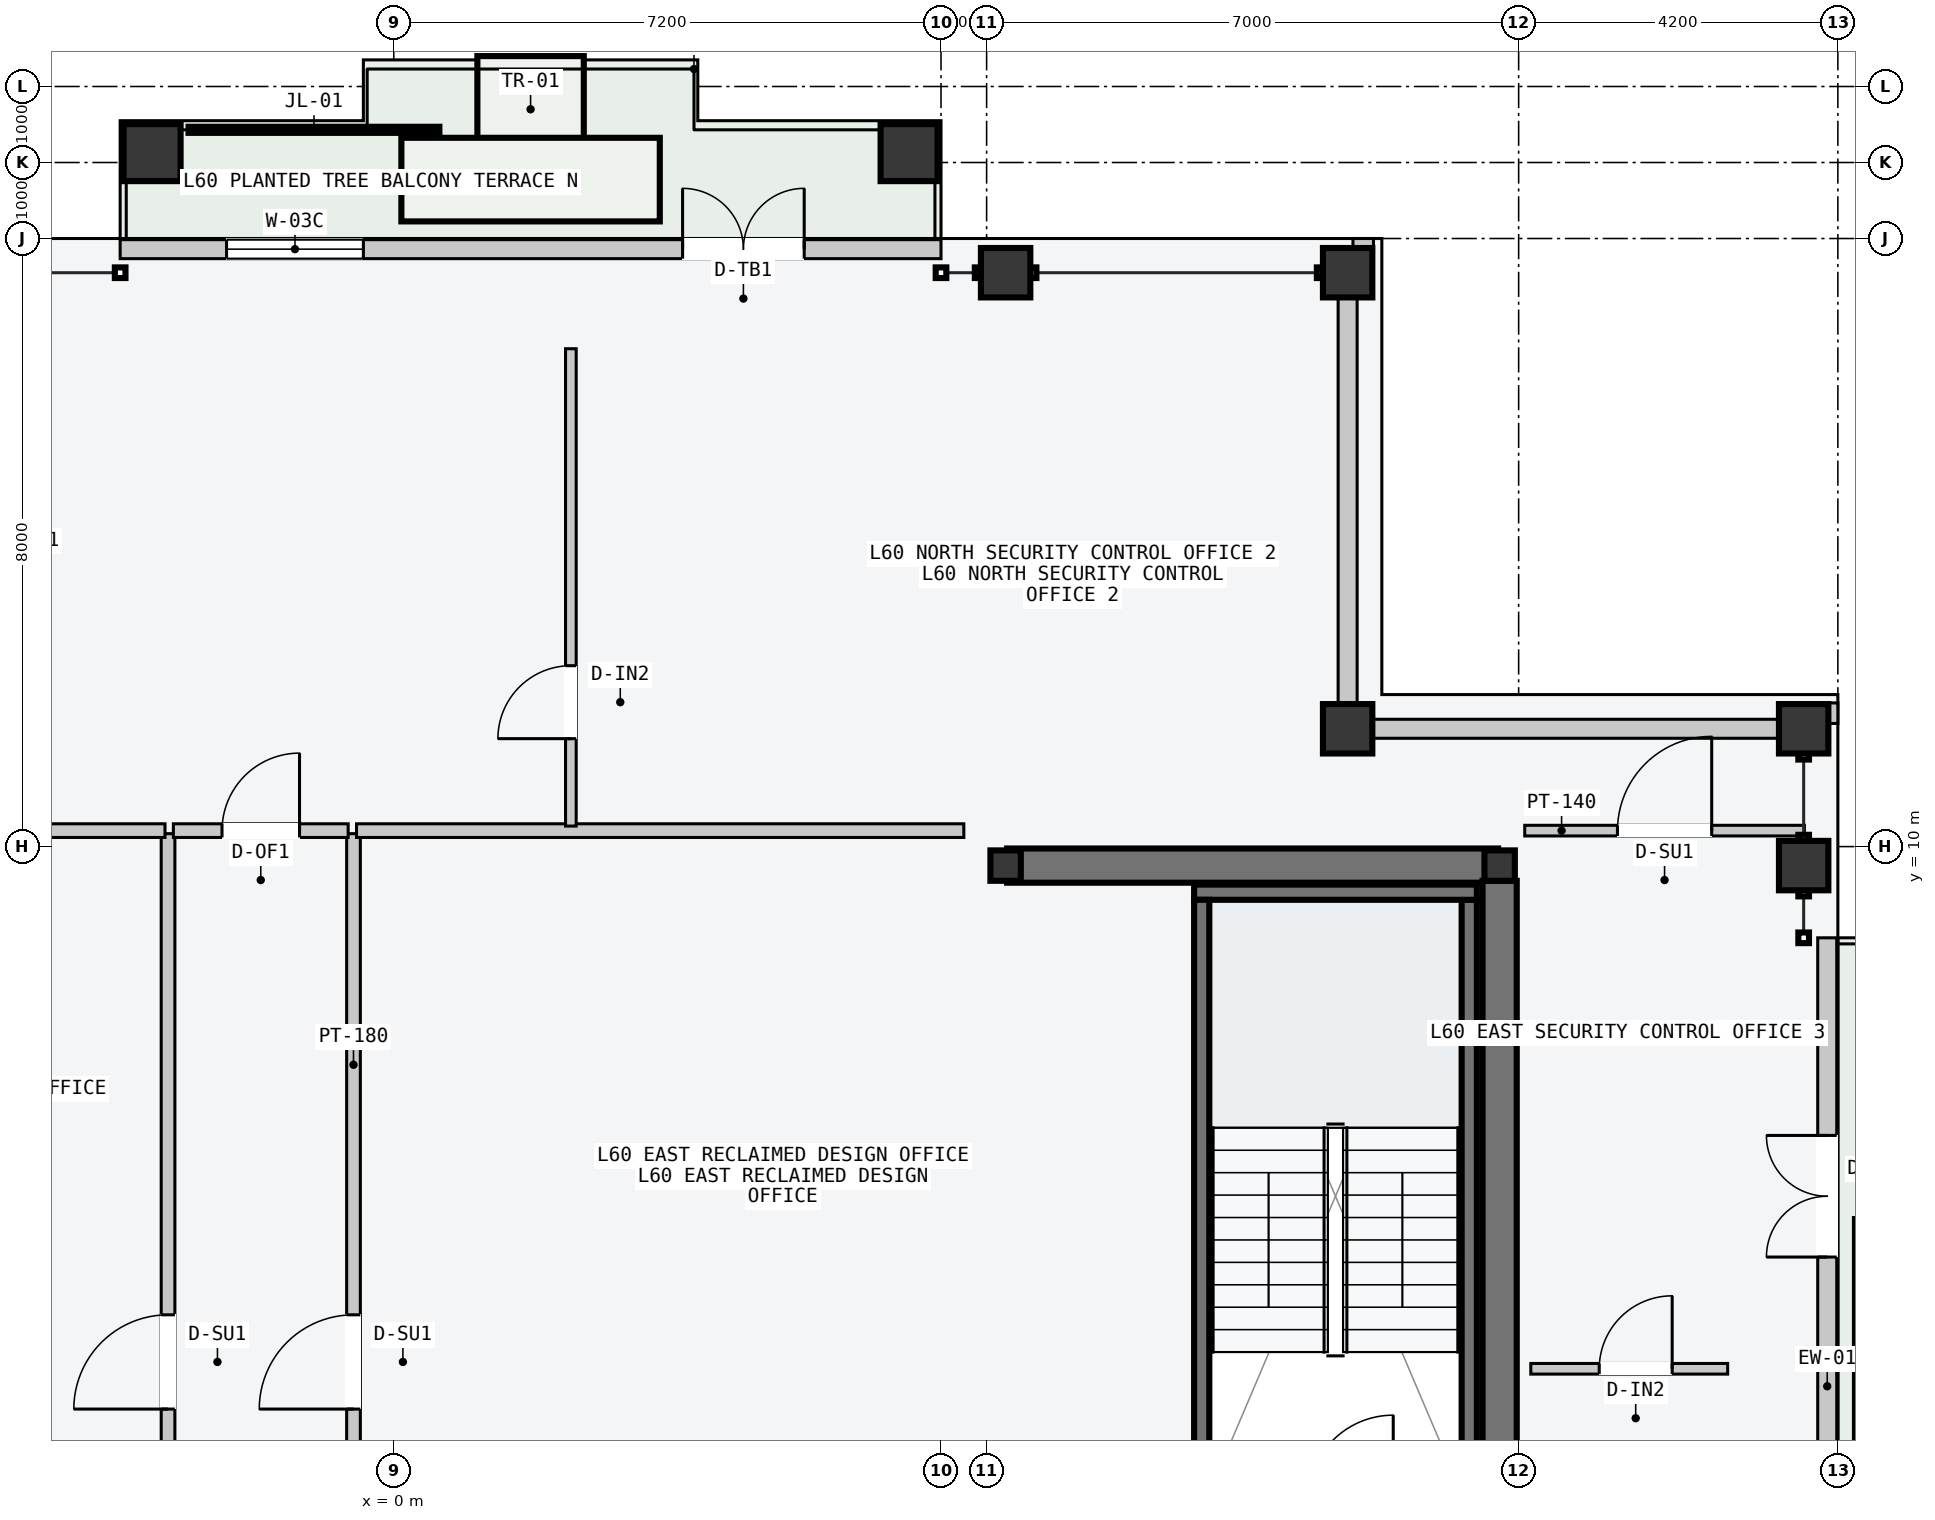
"""IFC4 building model, lengths in metres.
Left out: names, types, materials, properties, quantities, classifications, styles, units other than length and angle.
Written with IfcOpenShell. Run it as: python <this file> out.ifc"""

import sys

from ifc_helpers import new_model, si_unit, direction, frame, frame_2d, origin, origin_2d, place, context, subcontext, project, spatial, rectangle, hollow_rectangle, i_section, extrude, element, fill, save


model = new_model("IFC4")
c1 = context("Model", 3, precision=1e-05, world=origin(), true_north=direction((0.0, 1.0)))
c2 = subcontext(c1, "Body", "Model", "MODEL_VIEW")
j1 = project(units=[si_unit("LENGTHUNIT", "METRE"), si_unit("PLANEANGLEUNIT", "RADIAN")], contexts=[c1])
p1 = place(None, origin())
s1 = spatial("IfcSite", under=j1, at=p1, CompositionType="ELEMENT")
p2 = place(p1, origin())
s2 = spatial("IfcBuilding", under=s1, at=p2, CompositionType="ELEMENT")
p3 = place(p2, frame((0.0, 0.0, 229.2)))
s3 = spatial("IfcBuildingStorey", under=s2, at=p3, CompositionType="ELEMENT", Elevation=229.2)
p4 = place(p3, frame((8.07, 9.75, -0.2), z_axis=(0.0, 0.0, 1.0), x_axis=(1.0, 0.0, 0.0)))
e1 = element("IfcWall", 1, at=p4, inside=s3, PredefinedType="SHEAR", context=c2, shape_type="SweptSolid", body=[
    extrude(rectangle(XDim=6.46, YDim=0.45, at=frame_2d((3.23, 0.0))), origin(), (0.0, 0.0, 1.0), 3.6),
])
p5 = place(p3, frame((14.55, 0.2, -0.2), z_axis=(0.0, 0.0, 1.0), x_axis=(0.0, 1.0, 0.0)))
e2 = element("IfcWall", 2, at=p5, inside=s3, PredefinedType="SHEAR", context=c2, shape_type="SweptSolid", body=[
    extrude(rectangle(XDim=9.35, YDim=0.45, at=frame_2d((4.675, 0.0))), origin(), (0.0, 0.0, 1.0), 3.6),
])
p6 = place(p3, frame((14.15, 1.5, -0.2), z_axis=(0.0, 0.0, 1.0), x_axis=(0.0, 1.0, 0.0)))
e3 = element("IfcWall", 3, at=p6, inside=s3, PredefinedType="SOLIDWALL", context=c2, shape_type="SweptSolid", body=[
    extrude(rectangle(XDim=7.8, YDim=0.2, at=frame_2d((3.9, 0.0))), origin(), (0.0, 0.0, 1.0), 3.6),
])
p7 = place(p3, frame((10.53, 9.4, -0.2), z_axis=(0.0, 0.0, 1.0), x_axis=(1.0, 0.0, 0.0)))
e4 = element("IfcWall", 4, at=p7, inside=s3, PredefinedType="SOLIDWALL", context=c2, shape_type="SweptSolid", body=[
    extrude(rectangle(XDim=3.72, YDim=0.2, at=frame_2d((1.86, 0.0))), origin(), (0.0, 0.0, 1.0), 3.6),
])
p8 = place(p3, frame((10.63, 1.5, -0.2), z_axis=(0.0, 0.0, 1.0), x_axis=(0.0, 1.0, 0.0)))
e5 = element("IfcWall", 5, at=p8, inside=s3, PredefinedType="SOLIDWALL", context=c2, shape_type="SweptSolid", body=[
    extrude(rectangle(XDim=7.8, YDim=0.2, at=frame_2d((3.9, 0.0))), origin(), (0.0, 0.0, 1.0), 3.6),
])
for number, where, z_axis, x_axis in (
    (6, (8.05, 9.75, 0.0), (0.0, 0.0, 1.0), (1.0, 0.0, 0.0)),
    (7, (14.55, 9.75, 0.0), (0.0, 0.0, 1.0), (1.0, 0.0, 0.0)),
):
    element("IfcColumn", number, at=place(p3, frame(where, z_axis=z_axis, x_axis=x_axis)), inside=s3, PredefinedType="COLUMN", context=c2, shape_type="SweptSolid", body=[
        extrude(i_section(OverallWidth=0.4, OverallDepth=0.4, WebThickness=0.013, FlangeThickness=0.021, at=origin_2d()), origin(), (0.0, 0.0, 1.0), 3.6),
    ])
for number, where, z_axis, x_axis in (
    (8, (8.05, 17.55, 0.0), (0.0, 0.0, 1.0), (1.0, 0.0, 0.0)),
    (9, (12.55, 17.55, 0.0), (0.0, 0.0, 1.0), (1.0, 0.0, 0.0)),
    (10, (18.55, 9.75, 0.0), (0.0, 0.0, 1.0), (0.0, 1.0, 0.0)),
    (11, (18.55, 11.55, 0.0), (0.0, 0.0, 1.0), (0.0, 1.0, 0.0)),
    (12, (12.55, 11.55, 0.0), (0.0, 0.0, 1.0), (1.0, 0.0, 0.0)),
):
    element("IfcColumn", number, at=place(p3, frame(where, z_axis=z_axis, x_axis=x_axis)), inside=s3, PredefinedType="COLUMN", context=c2, shape_type="SweptSolid", body=[
        extrude(hollow_rectangle(XDim=0.65, YDim=0.65, WallThickness=0.028, at=origin_2d()), origin(), (0.0, 0.0, 1.0), 3.6),
    ])
for number, where, z_axis, x_axis in (
    (13, (-3.18, 19.13, 0.0), (0.0, 0.0, 1.0), (1.0, 0.0, 0.0)),
    (14, (6.78, 19.13, 0.0), (0.0, 0.0, 1.0), (1.0, 0.0, 0.0)),
):
    element("IfcColumn", number, at=place(p3, frame(where, z_axis=z_axis, x_axis=x_axis)), inside=s3, PredefinedType="COLUMN", context=c2, shape_type="SweptSolid", body=[
        extrude(hollow_rectangle(XDim=0.75, YDim=0.75, WallThickness=0.032, at=origin_2d()), origin(), (0.0, 0.0, 1.0), 3.6),
    ])
p9 = place(p3, frame((-3.6, 17.86, 0.0), z_axis=(0.0, 0.0, 1.0), x_axis=(1.0, 0.0, 0.0)))
e15 = element("IfcWall", 15, at=p9, inside=s3, PredefinedType="STANDARD", context=c2, shape_type="SweptSolid", body=[
    extrude(rectangle(XDim=10.8, YDim=0.25, at=frame_2d((5.4, 0.0))), origin(), (0.0, 0.0, 1.0), 3.4),
])
p10 = place(p9, frame((7.4, 0.0, 0.0)))
e16 = element("IfcOpeningElement", 16, at=p10, cuts=e15, PredefinedType="OPENING", context=c2, shape_type="SweptSolid", body=[
    extrude(rectangle(XDim=1.6, YDim=2.2, at=frame_2d((0.8, 1.1))), frame((0.0, 0.135, 0.0), z_axis=(0.0, -1.0, 0.0), x_axis=(1.0, 0.0, 0.0)), (0.0, 0.0, 1.0), 0.27),
])
p11 = place(p9, frame((1.4, 0.0, 0.85)))
e17 = element("IfcOpeningElement", 17, at=p11, cuts=e15, PredefinedType="OPENING", context=c2, shape_type="SweptSolid", body=[
    extrude(rectangle(XDim=1.8, YDim=2.05, at=frame_2d((0.9, 1.025))), frame((0.0, 0.135, 0.0), z_axis=(0.0, -1.0, 0.0), x_axis=(1.0, 0.0, 0.0)), (0.0, 0.0, 1.0), 0.27),
])
p12 = place(p3, frame((18.86, -2.0, 0.0), z_axis=(0.0, 0.0, 1.0), x_axis=(0.0, 1.0, 0.0)))
e18 = element("IfcWall", 18, at=p12, inside=s3, PredefinedType="STANDARD", context=c2, shape_type="SweptSolid", body=[
    extrude(rectangle(XDim=10.8, YDim=0.25, at=frame_2d((5.4, 0.0))), origin(), (0.0, 0.0, 1.0), 3.4),
])
p13 = place(p12, frame((6.6, 0.0, 0.0)))
e19 = element("IfcOpeningElement", 19, at=p13, cuts=e18, PredefinedType="OPENING", context=c2, shape_type="SweptSolid", body=[
    extrude(rectangle(XDim=1.6, YDim=2.2, at=frame_2d((0.8, 1.1))), frame((0.0, 0.135, 0.0), z_axis=(0.0, -1.0, 0.0), x_axis=(1.0, 0.0, 0.0)), (0.0, 0.0, 1.0), 0.27),
])
p14 = place(p12, frame((1.4, 0.0, 0.85)))
e20 = element("IfcOpeningElement", 20, at=p14, cuts=e18, PredefinedType="OPENING", context=c2, shape_type="SweptSolid", body=[
    extrude(rectangle(XDim=1.8, YDim=2.05, at=frame_2d((0.9, 1.025))), frame((0.0, 0.135, 0.0), z_axis=(0.0, -1.0, 0.0), x_axis=(1.0, 0.0, 0.0)), (0.0, 0.0, 1.0), 0.27),
])
for number, where, z_axis, x_axis in (
    (21, (12.885, 11.55, 0.0), (0.0, 0.0, 1.0), (1.0, 0.0, 0.0)),
    (22, (12.55, 11.885, 0.0), (0.0, 0.0, 1.0), (0.0, 1.0, 0.0)),
):
    element("IfcWall", number, at=place(p3, frame(where, z_axis=z_axis, x_axis=x_axis)), inside=s3, PredefinedType="STANDARD", context=c2, shape_type="SweptSolid", body=[
        extrude(rectangle(XDim=5.33, YDim=0.25, at=frame_2d((2.665, 0.0))), origin(), (0.0, 0.0, 1.0), 2.85),
    ])
for number, where, z_axis, x_axis in (
    (23, (12.62, 17.89, 0.0), (0.0, 0.0, 1.0), (1.0, 0.0, 0.0)),
    (24, (18.89, 11.62, 0.0), (0.0, 0.0, 1.0), (0.0, 1.0, 0.0)),
):
    element("IfcWall", number, at=place(p3, frame(where, z_axis=z_axis, x_axis=x_axis)), inside=s3, PredefinedType="PARAPET", context=c2, shape_type="SweptSolid", body=[
        extrude(rectangle(XDim=0.27, YDim=0.22, at=frame_2d((0.135, 0.0))), origin(), (0.0, 0.0, 1.0), 1.2),
    ])
p15 = place(p3, frame((-2.97, -3.5, 0.0), z_axis=(0.0, 0.0, 1.0), x_axis=(0.0, 1.0, 0.0)))
e25 = element("IfcWall", 25, at=p15, inside=s3, PredefinedType="PARTITIONING", context=c2, shape_type="SweptSolid", body=[
    extrude(rectangle(XDim=13.67, YDim=0.18, at=frame_2d((6.835, 0.0))), origin(), (0.0, 0.0, 1.0), 3.4),
])
p16 = place(p15, frame((6.1, 0.0, 0.0)))
e26 = element("IfcOpeningElement", 26, at=p16, cuts=e25, PredefinedType="OPENING", context=c2, shape_type="SweptSolid", body=[
    extrude(rectangle(XDim=1.24, YDim=2.24, at=frame_2d((0.62, 1.12))), frame((0.0, 0.1, 0.0), z_axis=(0.0, -1.0, 0.0), x_axis=(1.0, 0.0, 0.0)), (0.0, 0.0, 1.0), 0.2),
])
p17 = place(p15, frame((1.6, 0.0, 0.0)))
e27 = element("IfcOpeningElement", 27, at=p17, cuts=e25, PredefinedType="OPENING", context=c2, shape_type="SweptSolid", body=[
    extrude(rectangle(XDim=0.96, YDim=2.18, at=frame_2d((0.48, 1.09))), frame((0.0, 0.1, 0.0), z_axis=(0.0, -1.0, 0.0), x_axis=(1.0, 0.0, 0.0)), (0.0, 0.0, 1.0), 0.2),
])
p18 = place(p3, frame((-7.5, 10.21, 0.0), z_axis=(0.0, 0.0, 1.0), x_axis=(1.0, 0.0, 0.0)))
e28 = element("IfcWall", 28, at=p18, inside=s3, PredefinedType="PARTITIONING", context=c2, shape_type="SweptSolid", body=[
    extrude(rectangle(XDim=4.49, YDim=0.18, at=frame_2d((2.245, 0.0))), origin(), (0.0, 0.0, 1.0), 3.4),
])
p19 = place(p3, frame((-0.53, -3.5, 0.0), z_axis=(0.0, 0.0, 1.0), x_axis=(0.0, 1.0, 0.0)))
e29 = element("IfcWall", 29, at=p19, inside=s3, PredefinedType="PARTITIONING", context=c2, shape_type="SweptSolid", body=[
    extrude(rectangle(XDim=13.67, YDim=0.18, at=frame_2d((6.835, 0.0))), origin(), (0.0, 0.0, 1.0), 3.4),
])
p20 = place(p19, frame((6.1, 0.0, 0.0)))
e30 = element("IfcOpeningElement", 30, at=p20, cuts=e29, PredefinedType="OPENING", context=c2, shape_type="SweptSolid", body=[
    extrude(rectangle(XDim=1.24, YDim=2.24, at=frame_2d((0.62, 1.12))), frame((0.0, 0.1, 0.0), z_axis=(0.0, -1.0, 0.0), x_axis=(1.0, 0.0, 0.0)), (0.0, 0.0, 1.0), 0.2),
])
p21 = place(p19, frame((1.6, 0.0, 0.0)))
e31 = element("IfcOpeningElement", 31, at=p21, cuts=e29, PredefinedType="OPENING", context=c2, shape_type="SweptSolid", body=[
    extrude(rectangle(XDim=0.96, YDim=2.18, at=frame_2d((0.48, 1.09))), frame((0.0, 0.1, 0.0), z_axis=(0.0, -1.0, 0.0), x_axis=(1.0, 0.0, 0.0)), (0.0, 0.0, 1.0), 0.2),
])
p22 = place(p3, frame((-0.49, 10.21, 0.0), z_axis=(0.0, 0.0, 1.0), x_axis=(1.0, 0.0, 0.0)))
e32 = element("IfcWall", 32, at=p22, inside=s3, PredefinedType="PARTITIONING", context=c2, shape_type="SweptSolid", body=[
    extrude(rectangle(XDim=7.99, YDim=0.18, at=frame_2d((3.995, 0.0))), origin(), (0.0, 0.0, 1.0), 3.4),
])
p23 = place(p3, frame((2.33, 10.27, 0.0), z_axis=(0.0, 0.0, 1.0), x_axis=(0.0, 1.0, 0.0)))
e33 = element("IfcWall", 33, at=p23, inside=s3, PredefinedType="PARTITIONING", context=c2, shape_type="SweptSolid", body=[
    extrude(rectangle(XDim=6.28, YDim=0.14, at=frame_2d((3.14, 0.0))), origin(), (0.0, 0.0, 1.0), 3.4),
])
p24 = place(p23, frame((1.15, 0.0, 0.0)))
e34 = element("IfcOpeningElement", 34, at=p24, cuts=e33, PredefinedType="OPENING", context=c2, shape_type="SweptSolid", body=[
    extrude(rectangle(XDim=0.96, YDim=2.18, at=frame_2d((0.48, 1.09))), frame((0.0, 0.08, 0.0), z_axis=(0.0, -1.0, 0.0), x_axis=(1.0, 0.0, 0.0)), (0.0, 0.0, 1.0), 0.16),
])
p25 = place(p3, frame((-2.9, 10.21, 0.0), z_axis=(0.0, 0.0, 1.0), x_axis=(1.0, 0.0, 0.0)))
e35 = element("IfcWall", 35, at=p25, inside=s3, PredefinedType="PARTITIONING", context=c2, shape_type="SweptSolid", body=[
    extrude(rectangle(XDim=2.3, YDim=0.18, at=frame_2d((1.15, 0.0))), origin(), (0.0, 0.0, 1.0), 3.4),
])
p26 = place(p25, frame((0.64, 0.0, 0.0)))
e36 = element("IfcOpeningElement", 36, at=p26, cuts=e35, PredefinedType="OPENING", context=c2, shape_type="SweptSolid", body=[
    extrude(rectangle(XDim=1.02, YDim=2.2, at=frame_2d((0.51, 1.1))), frame((0.0, 0.1, 0.0), z_axis=(0.0, -1.0, 0.0), x_axis=(1.0, 0.0, 0.0)), (0.0, 0.0, 1.0), 0.2),
])
p27 = place(p3, frame((14.88, 10.21, 0.0), z_axis=(0.0, 0.0, 1.0), x_axis=(1.0, 0.0, 0.0)))
e37 = element("IfcWall", 37, at=p27, inside=s3, PredefinedType="PARTITIONING", context=c2, shape_type="SweptSolid", body=[
    extrude(rectangle(XDim=3.68, YDim=0.14, at=frame_2d((1.84, 0.0))), origin(), (0.0, 0.0, 1.0), 3.4),
])
p28 = place(p27, frame((1.22, 0.0, 0.0)))
e38 = element("IfcOpeningElement", 38, at=p28, cuts=e37, PredefinedType="OPENING", context=c2, shape_type="SweptSolid", body=[
    extrude(rectangle(XDim=1.24, YDim=2.24, at=frame_2d((0.62, 1.12))), frame((0.0, 0.08, 0.0), z_axis=(0.0, -1.0, 0.0), x_axis=(1.0, 0.0, 0.0)), (0.0, 0.0, 1.0), 0.16),
])
p29 = place(p3, frame((14.96, 3.13, 0.0), z_axis=(0.0, 0.0, 1.0), x_axis=(1.0, 0.0, 0.0)))
e39 = element("IfcWall", 39, at=p29, inside=s3, PredefinedType="PARTITIONING", context=c2, shape_type="SweptSolid", body=[
    extrude(rectangle(XDim=2.59, YDim=0.14, at=frame_2d((1.295, 0.0))), origin(), (0.0, 0.0, 1.0), 3.4),
])
p30 = place(p29, frame((0.9, 0.0, 0.0)))
e40 = element("IfcOpeningElement", 40, at=p30, cuts=e39, PredefinedType="OPENING", context=c2, shape_type="SweptSolid", body=[
    extrude(rectangle(XDim=0.96, YDim=2.18, at=frame_2d((0.48, 1.09))), frame((0.0, 0.08, 0.0), z_axis=(0.0, -1.0, 0.0), x_axis=(1.0, 0.0, 0.0)), (0.0, 0.0, 1.0), 0.16),
])
p31 = place(p10, origin())
e41 = element("IfcDoor", 41, at=p31, inside=s3, OperationType="DOUBLE_DOOR_SINGLE_SWING", PredefinedType="DOOR", context=c2, shape_type="SweptSolid", body=[
    extrude(rectangle(XDim=1.6, YDim=2.2, at=frame_2d((0.8, 1.1))), frame((0.0, 0.025, 0.0), z_axis=(0.0, -1.0, 0.0), x_axis=(1.0, 0.0, 0.0)), (0.0, 0.0, 1.0), 0.05),
])
fill(e16, e41)
p32 = place(p11, origin())
e42 = element("IfcWindow", 42, at=p32, inside=s3, PartitioningType="SINGLE_PANEL", PredefinedType="WINDOW", context=c2, shape_type="SweptSolid", body=[
    extrude(rectangle(XDim=1.8, YDim=2.05, at=frame_2d((0.9, 1.025))), frame((0.0, 0.03, 0.0), z_axis=(0.0, -1.0, 0.0), x_axis=(1.0, 0.0, 0.0)), (0.0, 0.0, 1.0), 0.06),
])
fill(e17, e42)
p33 = place(p13, origin())
e43 = element("IfcDoor", 43, at=p33, inside=s3, OperationType="DOUBLE_DOOR_SINGLE_SWING", PredefinedType="DOOR", context=c2, shape_type="SweptSolid", body=[
    extrude(rectangle(XDim=1.6, YDim=2.2, at=frame_2d((0.8, 1.1))), frame((0.0, 0.025, 0.0), z_axis=(0.0, -1.0, 0.0), x_axis=(1.0, 0.0, 0.0)), (0.0, 0.0, 1.0), 0.05),
])
fill(e19, e43)
p34 = place(p16, origin())
e44 = element("IfcDoor", 44, at=p34, inside=s3, OperationType="SINGLE_SWING_LEFT", PredefinedType="DOOR", context=c2, shape_type="SweptSolid", body=[
    extrude(rectangle(XDim=1.24, YDim=2.24, at=frame_2d((0.62, 1.12))), frame((0.0, 0.025, 0.0), z_axis=(0.0, -1.0, 0.0), x_axis=(1.0, 0.0, 0.0)), (0.0, 0.0, 1.0), 0.05),
])
fill(e26, e44)
p35 = place(p20, origin())
e45 = element("IfcDoor", 45, at=p35, inside=s3, OperationType="SINGLE_SWING_LEFT", PredefinedType="DOOR", context=c2, shape_type="SweptSolid", body=[
    extrude(rectangle(XDim=1.24, YDim=2.24, at=frame_2d((0.62, 1.12))), frame((0.0, 0.025, 0.0), z_axis=(0.0, -1.0, 0.0), x_axis=(1.0, 0.0, 0.0)), (0.0, 0.0, 1.0), 0.05),
])
fill(e30, e45)
p36 = place(p24, origin())
e46 = element("IfcDoor", 46, at=p36, inside=s3, OperationType="SINGLE_SWING_LEFT", PredefinedType="DOOR", context=c2, shape_type="SweptSolid", body=[
    extrude(rectangle(XDim=0.96, YDim=2.18, at=frame_2d((0.48, 1.09))), frame((0.0, 0.025, 0.0), z_axis=(0.0, -1.0, 0.0), x_axis=(1.0, 0.0, 0.0)), (0.0, 0.0, 1.0), 0.05),
])
fill(e34, e46)
p37 = place(p26, origin())
e47 = element("IfcDoor", 47, at=p37, inside=s3, OperationType="SINGLE_SWING_RIGHT", PredefinedType="DOOR", context=c2, shape_type="SweptSolid", body=[
    extrude(rectangle(XDim=1.02, YDim=2.2, at=frame_2d((0.51, 1.1))), frame((0.0, 0.025, 0.0), z_axis=(0.0, -1.0, 0.0), x_axis=(1.0, 0.0, 0.0)), (0.0, 0.0, 1.0), 0.05),
])
fill(e36, e47)
p38 = place(p28, origin())
e48 = element("IfcDoor", 48, at=p38, inside=s3, OperationType="SINGLE_SWING_RIGHT", PredefinedType="DOOR", context=c2, shape_type="SweptSolid", body=[
    extrude(rectangle(XDim=1.24, YDim=2.24, at=frame_2d((0.62, 1.12))), frame((0.0, 0.025, 0.0), z_axis=(0.0, -1.0, 0.0), x_axis=(1.0, 0.0, 0.0)), (0.0, 0.0, 1.0), 0.05),
])
fill(e38, e48)
p39 = place(p30, origin())
e49 = element("IfcDoor", 49, at=p39, inside=s3, OperationType="SINGLE_SWING_RIGHT", PredefinedType="DOOR", context=c2, shape_type="SweptSolid", body=[
    extrude(rectangle(XDim=0.96, YDim=2.18, at=frame_2d((0.48, 1.09))), frame((0.0, 0.025, 0.0), z_axis=(0.0, -1.0, 0.0), x_axis=(1.0, 0.0, 0.0)), (0.0, 0.0, 1.0), 0.05),
])
fill(e40, e49)
save(model, sys.argv[1])
